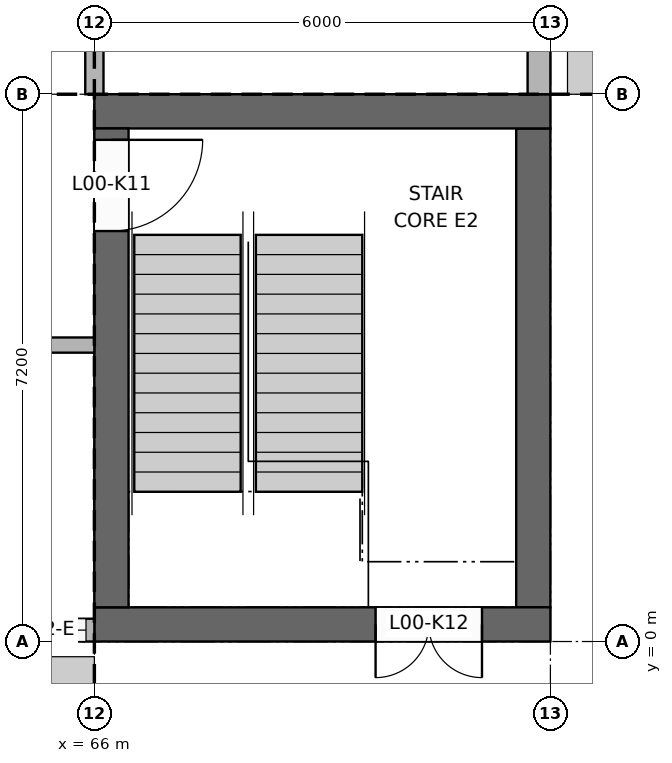
"""IFC4 building model, lengths in metres.
Left out: names, types, materials, properties, quantities, classifications, styles, units other than length and angle.
Written with IfcOpenShell. Run it as: python <this file> out.ifc"""

import sys

from ifc_helpers import new_model, si_unit, direction, frame, frame_2d, origin, place, context, subcontext, project, spatial, rectangle, extrude, element, fill, save


model = new_model("IFC4")
c1 = context("Model", 3, precision=1e-05, world=origin(), true_north=direction((0.0, 1.0)))
c2 = subcontext(c1, "Body", "Model", "MODEL_VIEW")
j1 = project(units=[si_unit("LENGTHUNIT", "METRE"), si_unit("PLANEANGLEUNIT", "RADIAN")], contexts=[c1])
p1 = place(None, origin())
s1 = spatial("IfcSite", under=j1, at=p1, CompositionType="ELEMENT")
p2 = place(p1, origin())
s2 = spatial("IfcBuilding", under=s1, at=p2, CompositionType="ELEMENT")
p3 = place(p2, origin())
s3 = spatial("IfcBuildingStorey", under=s2, at=p3, CompositionType="ELEMENT", Elevation=0.0)
p4 = place(p3, frame((66.0, 0.225, 0.0), z_axis=(0.0, 0.0, 1.0), x_axis=(1.0, 0.0, 0.0)))
e1 = element("IfcWall", 1, at=p4, inside=s3, PredefinedType="SHEAR", context=c2, shape_type="SweptSolid", body=[
    extrude(rectangle(XDim=6.0, YDim=0.45, at=frame_2d((3.0, 0.0))), origin(), (0.0, 0.0, 1.0), 4.0),
])
p5 = place(p4, frame((3.7, 0.0, 0.0)))
e2 = element("IfcOpeningElement", 2, at=p5, cuts=e1, PredefinedType="OPENING", context=c2, shape_type="SweptSolid", body=[
    extrude(rectangle(XDim=1.4, YDim=2.1, at=frame_2d((0.7, 1.05))), frame((0.0, 0.235, 0.0), z_axis=(0.0, -1.0, 0.0), x_axis=(1.0, 0.0, 0.0)), (0.0, 0.0, 1.0), 0.47),
])
p6 = place(p3, frame((66.0, 6.975, 0.0), z_axis=(0.0, 0.0, 1.0), x_axis=(1.0, 0.0, 0.0)))
e3 = element("IfcWall", 3, at=p6, inside=s3, PredefinedType="SHEAR", context=c2, shape_type="SweptSolid", body=[
    extrude(rectangle(XDim=6.0, YDim=0.45, at=frame_2d((3.0, 0.0))), origin(), (0.0, 0.0, 1.0), 4.0),
])
p7 = place(p3, frame((66.225, 0.45, 0.0), z_axis=(0.0, 0.0, 1.0), x_axis=(0.0, 1.0, 0.0)))
e4 = element("IfcWall", 4, at=p7, inside=s3, PredefinedType="SHEAR", context=c2, shape_type="SweptSolid", body=[
    extrude(rectangle(XDim=6.3, YDim=0.45, at=frame_2d((3.15, 0.0))), origin(), (0.0, 0.0, 1.0), 4.0),
])
p8 = place(p7, frame((4.95, 0.0, 0.0)))
e5 = element("IfcOpeningElement", 5, at=p8, cuts=e4, PredefinedType="OPENING", context=c2, shape_type="SweptSolid", body=[
    extrude(rectangle(XDim=1.2, YDim=2.1, at=frame_2d((0.6, 1.05))), frame((0.0, 0.235, 0.0), z_axis=(0.0, -1.0, 0.0), x_axis=(1.0, 0.0, 0.0)), (0.0, 0.0, 1.0), 0.47),
])
p9 = place(p3, frame((71.775, 0.45, 0.0), z_axis=(0.0, 0.0, 1.0), x_axis=(0.0, 1.0, 0.0)))
e6 = element("IfcWall", 6, at=p9, inside=s3, PredefinedType="SHEAR", context=c2, shape_type="SweptSolid", body=[
    extrude(rectangle(XDim=6.3, YDim=0.45, at=frame_2d((3.15, 0.0))), origin(), (0.0, 0.0, 1.0), 4.0),
])
p10 = place(p3, frame((60.4, 0.15, 0.0), z_axis=(0.0, 0.0, 1.0), x_axis=(1.0, 0.0, 0.0)))
e7 = element("IfcWall", 7, at=p10, inside=s3, PredefinedType="SOLIDWALL", context=c2, shape_type="SweptSolid", body=[
    extrude(rectangle(XDim=5.6, YDim=0.3, at=frame_2d((2.8, 0.0))), origin(), (0.0, 0.0, 1.0), 3.2),
])
p11 = place(p10, frame((0.11, 0.0, 0.9)))
e8 = element("IfcOpeningElement", 8, at=p11, cuts=e7, PredefinedType="OPENING", context=c2, shape_type="SweptSolid", body=[
    extrude(rectangle(XDim=0.9, YDim=1.2, at=frame_2d((0.45, 0.6))), frame((0.0, 0.16, 0.0), z_axis=(0.0, -1.0, 0.0), x_axis=(1.0, 0.0, 0.0)), (0.0, 0.0, 1.0), 0.32),
])
p12 = place(p10, frame((1.23, 0.0, 0.9)))
e9 = element("IfcOpeningElement", 9, at=p12, cuts=e7, PredefinedType="OPENING", context=c2, shape_type="SweptSolid", body=[
    extrude(rectangle(XDim=0.9, YDim=1.2, at=frame_2d((0.45, 0.6))), frame((0.0, 0.16, 0.0), z_axis=(0.0, -1.0, 0.0), x_axis=(1.0, 0.0, 0.0)), (0.0, 0.0, 1.0), 0.32),
])
p13 = place(p10, frame((2.35, 0.0, 0.9)))
e10 = element("IfcOpeningElement", 10, at=p13, cuts=e7, PredefinedType="OPENING", context=c2, shape_type="SweptSolid", body=[
    extrude(rectangle(XDim=0.9, YDim=1.2, at=frame_2d((0.45, 0.6))), frame((0.0, 0.16, 0.0), z_axis=(0.0, -1.0, 0.0), x_axis=(1.0, 0.0, 0.0)), (0.0, 0.0, 1.0), 0.32),
])
p14 = place(p10, frame((3.47, 0.0, 0.9)))
e11 = element("IfcOpeningElement", 11, at=p14, cuts=e7, PredefinedType="OPENING", context=c2, shape_type="SweptSolid", body=[
    extrude(rectangle(XDim=0.9, YDim=1.2, at=frame_2d((0.45, 0.6))), frame((0.0, 0.16, 0.0), z_axis=(0.0, -1.0, 0.0), x_axis=(1.0, 0.0, 0.0)), (0.0, 0.0, 1.0), 0.32),
])
p15 = place(p10, frame((4.59, 0.0, 0.9)))
e12 = element("IfcOpeningElement", 12, at=p15, cuts=e7, PredefinedType="OPENING", context=c2, shape_type="SweptSolid", body=[
    extrude(rectangle(XDim=0.9, YDim=1.2, at=frame_2d((0.45, 0.6))), frame((0.0, 0.16, 0.0), z_axis=(0.0, -1.0, 0.0), x_axis=(1.0, 0.0, 0.0)), (0.0, 0.0, 1.0), 0.32),
])
p16 = place(p3, frame((71.85, 7.2, 0.0), z_axis=(0.0, 0.0, 1.0), x_axis=(0.0, 1.0, 0.0)))
e13 = element("IfcWall", 13, at=p16, inside=s3, PredefinedType="SOLIDWALL", context=c2, shape_type="SweptSolid", body=[
    extrude(rectangle(XDim=6.8, YDim=0.3, at=frame_2d((3.4, 0.0))), origin(), (0.0, 0.0, 1.0), 3.1),
])
p17 = place(p16, frame((1.74, 0.0, 0.0)))
e14 = element("IfcOpeningElement", 14, at=p17, cuts=e13, PredefinedType="OPENING", context=c2, shape_type="SweptSolid", body=[
    extrude(rectangle(XDim=1.8, YDim=2.4, at=frame_2d((0.9, 1.2))), frame((0.0, 0.16, 0.0), z_axis=(0.0, -1.0, 0.0), x_axis=(1.0, 0.0, 0.0)), (0.0, 0.0, 1.0), 0.32),
])
p18 = place(p16, frame((5.71, 0.0, 0.9)))
e15 = element("IfcOpeningElement", 15, at=p18, cuts=e13, PredefinedType="OPENING", context=c2, shape_type="SweptSolid", body=[
    extrude(rectangle(XDim=0.9, YDim=1.2, at=frame_2d((0.45, 0.6))), frame((0.0, 0.16, 0.0), z_axis=(0.0, -1.0, 0.0), x_axis=(1.0, 0.0, 0.0)), (0.0, 0.0, 1.0), 0.32),
])
p19 = place(p3, frame((66.0, 7.2, 0.0), z_axis=(0.0, 0.0, 1.0), x_axis=(0.0, 1.0, 0.0)))
e16 = element("IfcWall", 16, at=p19, inside=s3, PredefinedType="PARTITIONING", context=c2, shape_type="SweptSolid", body=[
    extrude(rectangle(XDim=5.52, YDim=0.24, at=frame_2d((2.76, 0.0))), origin(), (0.0, 0.0, 1.0), 3.1),
])
p20 = place(p3, frame((54.15, 3.9, 0.0), z_axis=(0.0, 0.0, 1.0), x_axis=(1.0, 0.0, 0.0)))
e17 = element("IfcWall", 17, at=p20, inside=s3, PredefinedType="PARTITIONING", context=c2, shape_type="SweptSolid", body=[
    extrude(rectangle(XDim=11.85, YDim=0.2, at=frame_2d((5.925, 0.0))), origin(), (0.0, 0.0, 1.0), 3.1),
])
p21 = place(p20, frame((5.425, 0.0, 0.0)))
e18 = element("IfcOpeningElement", 18, at=p21, cuts=e17, PredefinedType="OPENING", context=c2, shape_type="SweptSolid", body=[
    extrude(rectangle(XDim=1.0, YDim=2.1, at=frame_2d((0.5, 1.05))), frame((0.0, 0.11, 0.0), z_axis=(0.0, -1.0, 0.0), x_axis=(1.0, 0.0, 0.0)), (0.0, 0.0, 1.0), 0.22),
])
p22 = place(p15, origin())
e19 = element("IfcWindow", 19, at=p22, inside=s3, PartitioningType="SINGLE_PANEL", PredefinedType="WINDOW", context=c2, shape_type="SweptSolid", body=[
    extrude(rectangle(XDim=0.9, YDim=1.2, at=frame_2d((0.45, 0.6))), frame((0.0, 0.03, 0.0), z_axis=(0.0, -1.0, 0.0), x_axis=(1.0, 0.0, 0.0)), (0.0, 0.0, 1.0), 0.06),
])
fill(e12, e19)
p23 = place(p8, frame((1.2, 0.0, 0.0), z_axis=(0.0, 0.0, 1.0), x_axis=(-1.0, 0.0, 0.0)))
e20 = element("IfcDoor", 20, at=p23, inside=s3, OperationType="SINGLE_SWING_LEFT", PredefinedType="DOOR", context=c2, shape_type="SweptSolid", body=[
    extrude(rectangle(XDim=1.2, YDim=2.1, at=frame_2d((0.6, 1.05))), frame((0.0, 0.025, 0.0), z_axis=(0.0, -1.0, 0.0), x_axis=(1.0, 0.0, 0.0)), (0.0, 0.0, 1.0), 0.05),
])
fill(e5, e20)
p24 = place(p5, frame((1.4, 0.0, 0.0), z_axis=(0.0, 0.0, 1.0), x_axis=(-1.0, 0.0, 0.0)))
e21 = element("IfcDoor", 21, at=p24, inside=s3, OperationType="DOUBLE_DOOR_SINGLE_SWING", PredefinedType="DOOR", context=c2, shape_type="SweptSolid", body=[
    extrude(rectangle(XDim=1.4, YDim=2.1, at=frame_2d((0.7, 1.05))), frame((0.0, 0.025, 0.0), z_axis=(0.0, -1.0, 0.0), x_axis=(1.0, 0.0, 0.0)), (0.0, 0.0, 1.0), 0.05),
])
fill(e2, e21)
save(model, sys.argv[1])
